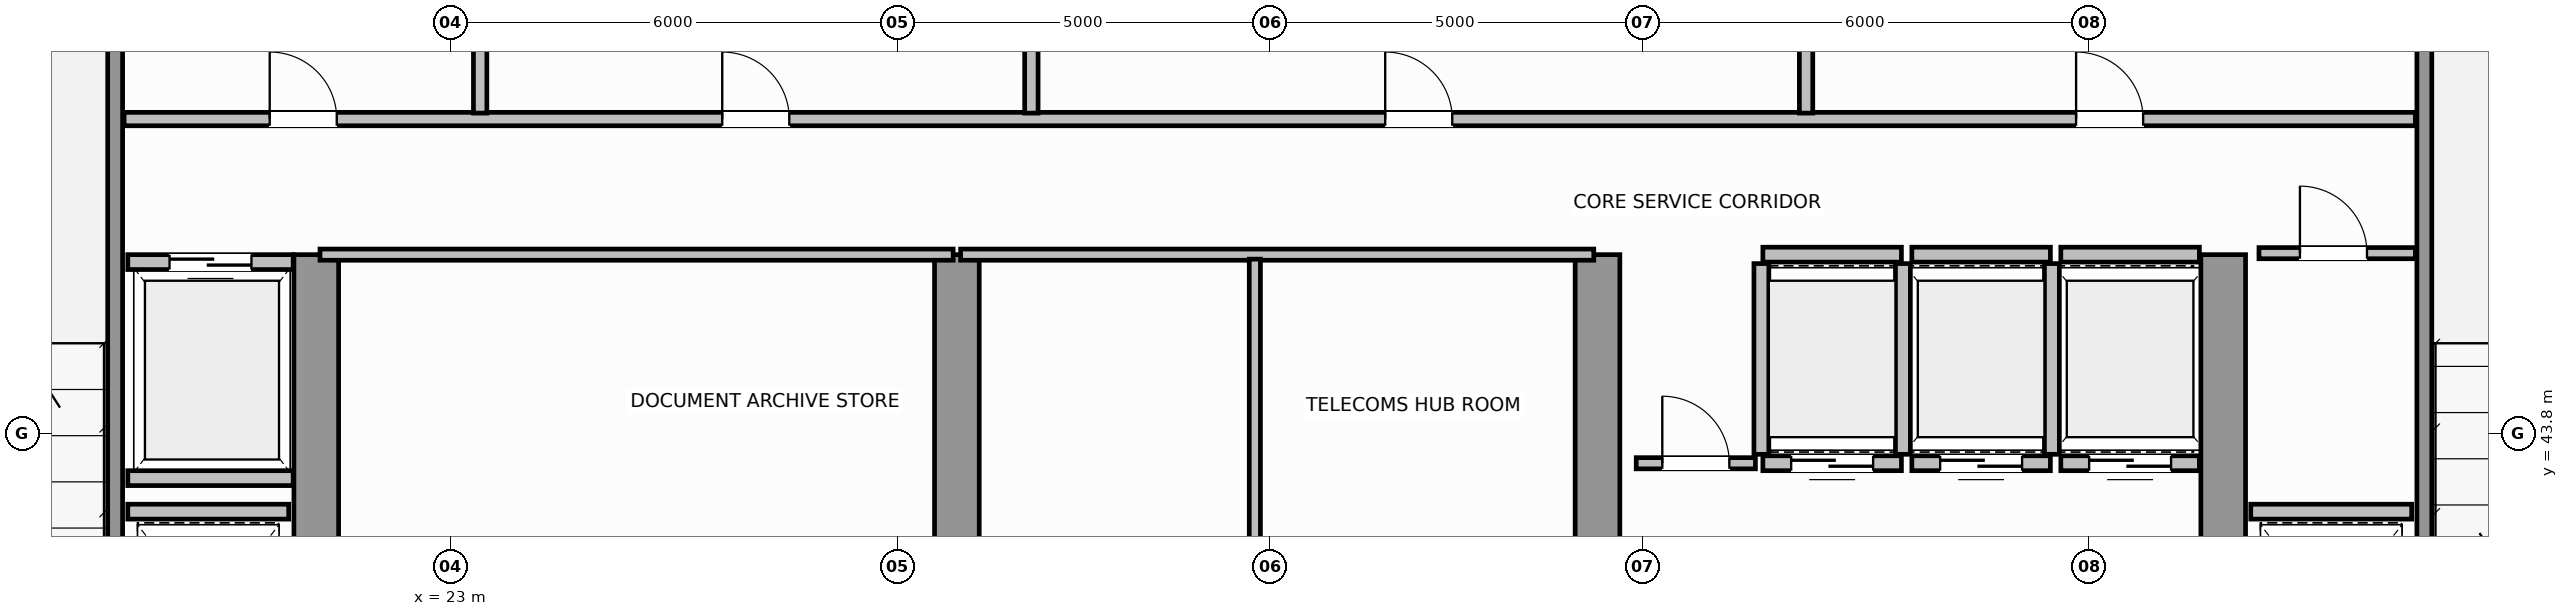
"""IFC4 building model, lengths in metres.
Left out: names, types, materials, properties, quantities, classifications, styles, units other than length and angle.
Written with IfcOpenShell. Run it as: python <this file> out.ifc"""

import sys

from ifc_helpers import new_model, si_unit, direction, frame, frame_2d, origin, place, context, subcontext, project, spatial, rectangle, extrude, source, transform, mapped, element, fill, save


model = new_model("IFC4")
c1 = context("Model", 3, precision=1e-05, world=origin(), true_north=direction((0.0, 1.0)))
c2 = subcontext(c1, "Body", "Model", "MODEL_VIEW")
j1 = project(units=[si_unit("LENGTHUNIT", "METRE"), si_unit("PLANEANGLEUNIT", "RADIAN")], contexts=[c1])
p1 = place(None, origin())
s1 = spatial("IfcSite", under=j1, at=p1, CompositionType="ELEMENT")
p2 = place(p1, origin())
s2 = spatial("IfcBuilding", under=s1, at=p2, CompositionType="ELEMENT")
p3 = place(p2, frame((0.0, 0.0, 223.2)))
s3 = spatial("IfcBuildingStorey", under=s2, at=p3, CompositionType="ELEMENT", Elevation=223.2)
for number, where, z_axis, x_axis in (
    (1, (21.2, 36.82, 0.0), (0.0, 0.0, 1.0), (0.0, 1.0, 0.0)),
    (2, (29.8, 36.82, 0.0), (0.0, 0.0, 1.0), (0.0, 1.0, 0.0)),
    (3, (38.4, 36.82, 0.0), (0.0, 0.0, 1.0), (0.0, 1.0, 0.0)),
    (4, (46.8, 36.82, 0.0), (0.0, 0.0, 1.0), (0.0, 1.0, 0.0)),
):
    element("IfcWall", number, at=place(p3, frame(where, z_axis=z_axis, x_axis=x_axis)), inside=s3, PredefinedType="SHEAR", context=c2, shape_type="SweptSolid", body=[
        extrude(rectangle(XDim=9.38, YDim=0.6, at=frame_2d((4.69, 0.0))), origin(), (0.0, 0.0, 1.0), 3.8),
    ])
for number, where, z_axis, x_axis in (
    (5, (18.5, 39.96, 0.0), (0.0, 0.0, 1.0), (0.0, 1.0, 0.0)),
    (6, (49.5, 39.96, 0.0), (0.0, 0.0, 1.0), (0.0, 1.0, 0.0)),
):
    element("IfcWall", number, at=place(p3, frame(where, z_axis=z_axis, x_axis=x_axis)), inside=s3, PredefinedType="SOLIDWALL", context=c2, shape_type="SweptSolid", body=[
        extrude(rectangle(XDim=9.93, YDim=0.2, at=frame_2d((4.965, 0.0))), origin(), (0.0, 0.0, 1.0), 3.8),
    ])
p4 = place(p3, frame((40.62, 43.4, 0.0), z_axis=(0.0, 0.0, 1.0), x_axis=(1.0, 0.0, 0.0)))
e7 = element("IfcWall", 7, at=p4, inside=s3, PredefinedType="SOLIDWALL", context=c2, shape_type="SweptSolid", body=[
    extrude(rectangle(XDim=1.86, YDim=0.2, at=frame_2d((0.93, 0.0))), origin(), (0.0, 0.0, 1.0), 3.58),
])
p5 = place(p4, frame((0.38, 0.0, 0.0)))
e8 = element("IfcOpeningElement", 8, at=p5, cuts=e7, PredefinedType="OPENING", context=c2, shape_type="SweptSolid", body=[
    extrude(rectangle(XDim=1.1, YDim=2.15, at=frame_2d((0.55, 1.075))), frame((0.0, 0.11, 0.0), z_axis=(0.0, -1.0, 0.0), x_axis=(1.0, 0.0, 0.0)), (0.0, 0.0, 1.0), 0.22),
])
p6 = place(p3, frame((40.62, 46.2, 0.0), z_axis=(0.0, 0.0, 1.0), x_axis=(1.0, 0.0, 0.0)))
e9 = element("IfcWall", 9, at=p6, inside=s3, PredefinedType="SOLIDWALL", context=c2, shape_type="SweptSolid", body=[
    extrude(rectangle(XDim=1.86, YDim=0.2, at=frame_2d((0.93, 0.0))), origin(), (0.0, 0.0, 1.0), 3.58),
])
for number, where, z_axis, x_axis in (
    (10, (40.6, 43.52, 0.0), (0.0, 0.0, 1.0), (0.0, 1.0, 0.0)),
    (11, (42.5, 43.52, 0.0), (0.0, 0.0, 1.0), (0.0, 1.0, 0.0)),
):
    element("IfcWall", number, at=place(p3, frame(where, z_axis=z_axis, x_axis=x_axis)), inside=s3, PredefinedType="SOLIDWALL", context=c2, shape_type="SweptSolid", body=[
        extrude(rectangle(XDim=2.56, YDim=0.2, at=frame_2d((1.28, 0.0))), origin(), (0.0, 0.0, 1.0), 3.58),
    ])
p7 = place(p3, frame((42.62, 43.4, 0.0), z_axis=(0.0, 0.0, 1.0), x_axis=(1.0, 0.0, 0.0)))
e12 = element("IfcWall", 12, at=p7, inside=s3, PredefinedType="SOLIDWALL", context=c2, shape_type="SweptSolid", body=[
    extrude(rectangle(XDim=1.86, YDim=0.2, at=frame_2d((0.93, 0.0))), origin(), (0.0, 0.0, 1.0), 3.58),
])
p8 = place(p7, frame((0.38, 0.0, 0.0)))
e13 = element("IfcOpeningElement", 13, at=p8, cuts=e12, PredefinedType="OPENING", context=c2, shape_type="SweptSolid", body=[
    extrude(rectangle(XDim=1.1, YDim=2.15, at=frame_2d((0.55, 1.075))), frame((0.0, 0.11, 0.0), z_axis=(0.0, -1.0, 0.0), x_axis=(1.0, 0.0, 0.0)), (0.0, 0.0, 1.0), 0.22),
])
p9 = place(p3, frame((42.62, 46.2, 0.0), z_axis=(0.0, 0.0, 1.0), x_axis=(1.0, 0.0, 0.0)))
e14 = element("IfcWall", 14, at=p9, inside=s3, PredefinedType="SOLIDWALL", context=c2, shape_type="SweptSolid", body=[
    extrude(rectangle(XDim=1.86, YDim=0.2, at=frame_2d((0.93, 0.0))), origin(), (0.0, 0.0, 1.0), 3.58),
])
p10 = place(p3, frame((44.5, 43.52, 0.0), z_axis=(0.0, 0.0, 1.0), x_axis=(0.0, 1.0, 0.0)))
e15 = element("IfcWall", 15, at=p10, inside=s3, PredefinedType="SOLIDWALL", context=c2, shape_type="SweptSolid", body=[
    extrude(rectangle(XDim=2.56, YDim=0.2, at=frame_2d((1.28, 0.0))), origin(), (0.0, 0.0, 1.0), 3.58),
])
p11 = place(p3, frame((44.62, 43.4, 0.0), z_axis=(0.0, 0.0, 1.0), x_axis=(1.0, 0.0, 0.0)))
e16 = element("IfcWall", 16, at=p11, inside=s3, PredefinedType="SOLIDWALL", context=c2, shape_type="SweptSolid", body=[
    extrude(rectangle(XDim=1.86, YDim=0.2, at=frame_2d((0.93, 0.0))), origin(), (0.0, 0.0, 1.0), 3.58),
])
p12 = place(p11, frame((0.38, 0.0, 0.0)))
e17 = element("IfcOpeningElement", 17, at=p12, cuts=e16, PredefinedType="OPENING", context=c2, shape_type="SweptSolid", body=[
    extrude(rectangle(XDim=1.1, YDim=2.15, at=frame_2d((0.55, 1.075))), frame((0.0, 0.11, 0.0), z_axis=(0.0, -1.0, 0.0), x_axis=(1.0, 0.0, 0.0)), (0.0, 0.0, 1.0), 0.22),
])
p13 = place(p3, frame((44.62, 46.2, 0.0), z_axis=(0.0, 0.0, 1.0), x_axis=(1.0, 0.0, 0.0)))
e18 = element("IfcWall", 18, at=p13, inside=s3, PredefinedType="SOLIDWALL", context=c2, shape_type="SweptSolid", body=[
    extrude(rectangle(XDim=1.86, YDim=0.2, at=frame_2d((0.93, 0.0))), origin(), (0.0, 0.0, 1.0), 3.58),
])
p14 = place(p3, frame((18.67, 46.1, 0.0), z_axis=(0.0, 0.0, 1.0), x_axis=(1.0, 0.0, 0.0)))
e19 = element("IfcWall", 19, at=p14, inside=s3, PredefinedType="SOLIDWALL", context=c2, shape_type="SweptSolid", body=[
    extrude(rectangle(XDim=2.22, YDim=0.2, at=frame_2d((1.11, 0.0))), origin(), (0.0, 0.0, 1.0), 3.58),
])
p15 = place(p14, frame((0.56, 0.0, 0.0)))
e20 = element("IfcOpeningElement", 20, at=p15, cuts=e19, PredefinedType="OPENING", context=c2, shape_type="SweptSolid", body=[
    extrude(rectangle(XDim=1.1, YDim=2.15, at=frame_2d((0.55, 1.075))), frame((0.0, 0.11, 0.0), z_axis=(0.0, -1.0, 0.0), x_axis=(1.0, 0.0, 0.0)), (0.0, 0.0, 1.0), 0.22),
])
p16 = place(p3, frame((18.67, 43.2, 0.0), z_axis=(0.0, 0.0, 1.0), x_axis=(1.0, 0.0, 0.0)))
e21 = element("IfcWall", 21, at=p16, inside=s3, PredefinedType="SOLIDWALL", context=c2, shape_type="SweptSolid", body=[
    extrude(rectangle(XDim=2.22, YDim=0.2, at=frame_2d((1.11, 0.0))), origin(), (0.0, 0.0, 1.0), 3.58),
])
for number, where, z_axis, x_axis in (
    (22, (18.67, 42.75, 0.0), (0.0, 0.0, 1.0), (1.0, 0.0, 0.0)),
    (23, (47.17, 42.75, 0.0), (0.0, 0.0, 1.0), (1.0, 0.0, 0.0)),
):
    element("IfcWall", number, at=place(p3, frame(where, z_axis=z_axis, x_axis=x_axis)), inside=s3, PredefinedType="SOLIDWALL", context=c2, shape_type="SweptSolid", body=[
        extrude(rectangle(XDim=2.16, YDim=0.2, at=frame_2d((1.08, 0.0))), origin(), (0.0, 0.0, 1.0), 3.58),
    ])
for number, where, z_axis, x_axis in (
    (24, (21.25, 46.2, 0.0), (0.0, 0.0, 1.0), (1.0, 0.0, 0.0)),
    (25, (29.85, 46.2, 0.0), (0.0, 0.0, 1.0), (1.0, 0.0, 0.0)),
):
    element("IfcWall", number, at=place(p3, frame(where, z_axis=z_axis, x_axis=x_axis)), inside=s3, PredefinedType="PARTITIONING", context=c2, shape_type="SweptSolid", body=[
        extrude(rectangle(XDim=8.5, YDim=0.15, at=frame_2d((4.25, 0.0))), origin(), (0.0, 0.0, 1.0), 3.58),
    ])
p17 = place(p3, frame((33.8, 36.56, 0.0), z_axis=(0.0, 0.0, 1.0), x_axis=(0.0, 1.0, 0.0)))
e26 = element("IfcWall", 26, at=p17, inside=s3, PredefinedType="PARTITIONING", context=c2, shape_type="SweptSolid", body=[
    extrude(rectangle(XDim=9.58, YDim=0.15, at=frame_2d((4.79, 0.0))), origin(), (0.0, 0.0, 1.0), 3.58),
])
p18 = place(p17, frame((4.2, 0.0, 0.0)))
e27 = element("IfcOpeningElement", 27, at=p18, cuts=e26, PredefinedType="OPENING", context=c2, shape_type="SweptSolid", body=[
    extrude(rectangle(XDim=0.9, YDim=2.1, at=frame_2d((0.45, 1.05))), frame((0.0, 0.085, 0.0), z_axis=(0.0, -1.0, 0.0), x_axis=(1.0, 0.0, 0.0)), (0.0, 0.0, 1.0), 0.17),
])
p19 = place(p3, frame((47.28, 46.22, 0.0), z_axis=(0.0, 0.0, 1.0), x_axis=(1.0, 0.0, 0.0)))
e28 = element("IfcWall", 28, at=p19, inside=s3, PredefinedType="PARTITIONING", context=c2, shape_type="SweptSolid", body=[
    extrude(rectangle(XDim=2.1, YDim=0.15, at=frame_2d((1.05, 0.0))), origin(), (0.0, 0.0, 1.0), 3.58),
])
p20 = place(p19, frame((0.55, 0.0, 0.0)))
e29 = element("IfcOpeningElement", 29, at=p20, cuts=e28, PredefinedType="OPENING", context=c2, shape_type="SweptSolid", body=[
    extrude(rectangle(XDim=0.9, YDim=2.1, at=frame_2d((0.45, 1.05))), frame((0.0, 0.085, 0.0), z_axis=(0.0, -1.0, 0.0), x_axis=(1.0, 0.0, 0.0)), (0.0, 0.0, 1.0), 0.17),
])
p21 = place(p3, frame((38.92, 43.4, 0.0), z_axis=(0.0, 0.0, 1.0), x_axis=(1.0, 0.0, 0.0)))
e30 = element("IfcWall", 30, at=p21, inside=s3, PredefinedType="PARTITIONING", context=c2, shape_type="SweptSolid", body=[
    extrude(rectangle(XDim=1.6, YDim=0.15, at=frame_2d((0.8, 0.0))), origin(), (0.0, 0.0, 1.0), 3.58),
])
p22 = place(p21, frame((0.35, 0.0, 0.0)))
e31 = element("IfcOpeningElement", 31, at=p22, cuts=e30, PredefinedType="OPENING", context=c2, shape_type="SweptSolid", body=[
    extrude(rectangle(XDim=0.9, YDim=2.1, at=frame_2d((0.45, 1.05))), frame((0.0, 0.085, 0.0), z_axis=(0.0, -1.0, 0.0), x_axis=(1.0, 0.0, 0.0)), (0.0, 0.0, 1.0), 0.17),
])
p23 = place(p3, frame((18.62, 48.02, 0.0), z_axis=(0.0, 0.0, 1.0), x_axis=(1.0, 0.0, 0.0)))
e32 = element("IfcWall", 32, at=p23, inside=s3, PredefinedType="PLUMBINGWALL", context=c2, shape_type="SweptSolid", body=[
    extrude(rectangle(XDim=30.76, YDim=0.18, at=frame_2d((15.38, 0.0))), origin(), (0.0, 0.0, 1.0), 3.58),
])
p24 = place(p23, frame((1.955, 0.0, 0.0)))
e33 = element("IfcOpeningElement", 33, at=p24, cuts=e32, PredefinedType="OPENING", context=c2, shape_type="SweptSolid", body=[
    extrude(rectangle(XDim=0.9, YDim=2.15, at=frame_2d((0.45, 1.075))), frame((0.0, 0.1, 0.0), z_axis=(0.0, -1.0, 0.0), x_axis=(1.0, 0.0, 0.0)), (0.0, 0.0, 1.0), 0.2),
])
p25 = place(p23, frame((8.03, 0.0, 0.0)))
e34 = element("IfcOpeningElement", 34, at=p25, cuts=e32, PredefinedType="OPENING", context=c2, shape_type="SweptSolid", body=[
    extrude(rectangle(XDim=0.9, YDim=2.15, at=frame_2d((0.45, 1.075))), frame((0.0, 0.1, 0.0), z_axis=(0.0, -1.0, 0.0), x_axis=(1.0, 0.0, 0.0)), (0.0, 0.0, 1.0), 0.2),
])
p26 = place(p23, frame((16.93, 0.0, 0.0)))
e35 = element("IfcOpeningElement", 35, at=p26, cuts=e32, PredefinedType="OPENING", context=c2, shape_type="SweptSolid", body=[
    extrude(rectangle(XDim=0.9, YDim=2.15, at=frame_2d((0.45, 1.075))), frame((0.0, 0.1, 0.0), z_axis=(0.0, -1.0, 0.0), x_axis=(1.0, 0.0, 0.0)), (0.0, 0.0, 1.0), 0.2),
])
p27 = place(p23, frame((26.205, 0.0, 0.0)))
e36 = element("IfcOpeningElement", 36, at=p27, cuts=e32, PredefinedType="OPENING", context=c2, shape_type="SweptSolid", body=[
    extrude(rectangle(XDim=0.9, YDim=2.15, at=frame_2d((0.45, 1.075))), frame((0.0, 0.1, 0.0), z_axis=(0.0, -1.0, 0.0), x_axis=(1.0, 0.0, 0.0)), (0.0, 0.0, 1.0), 0.2),
])
for number, where, z_axis, x_axis in (
    (37, (23.4, 48.1, 0.0), (0.0, 0.0, 1.0), (0.0, 1.0, 0.0)),
    (38, (30.8, 48.1, 0.0), (0.0, 0.0, 1.0), (0.0, 1.0, 0.0)),
    (39, (41.2, 48.1, 0.0), (0.0, 0.0, 1.0), (0.0, 1.0, 0.0)),
):
    element("IfcWall", number, at=place(p3, frame(where, z_axis=z_axis, x_axis=x_axis)), inside=s3, PredefinedType="PLUMBINGWALL", context=c2, shape_type="SweptSolid", body=[
        extrude(rectangle(XDim=2.28, YDim=0.18, at=frame_2d((1.14, 0.0))), origin(), (0.0, 0.0, 1.0), 3.58),
    ])
m1 = source(origin(), c2, "Body", "SweptSolid", [
    extrude(rectangle(XDim=1.1, YDim=2.15, at=frame_2d((0.55, 1.075))), frame((0.0, 0.025, 0.0), z_axis=(0.0, -1.0, 0.0), x_axis=(1.0, 0.0, 0.0)), (0.0, 0.0, 1.0), 0.05),
])
p28 = place(p5, origin())
e40 = element("IfcDoor", 40, at=p28, inside=s3, OperationType="DOUBLE_DOOR_SLIDING", PredefinedType="DOOR", context=c2, shape_type="MappedRepresentation", body=[
    mapped(m1, transform((0.0, 0.0, 0.0), scale=1.0)),
])
fill(e8, e40)
p29 = place(p8, origin())
e41 = element("IfcDoor", 41, at=p29, inside=s3, OperationType="DOUBLE_DOOR_SLIDING", PredefinedType="DOOR", context=c2, shape_type="MappedRepresentation", body=[
    mapped(m1, transform((0.0, 0.0, 0.0), scale=1.0)),
])
fill(e13, e41)
p30 = place(p12, origin())
e42 = element("IfcDoor", 42, at=p30, inside=s3, OperationType="DOUBLE_DOOR_SLIDING", PredefinedType="DOOR", context=c2, shape_type="MappedRepresentation", body=[
    mapped(m1, transform((0.0, 0.0, 0.0), scale=1.0)),
])
fill(e17, e42)
p31 = place(p15, origin())
e43 = element("IfcDoor", 43, at=p31, inside=s3, OperationType="DOUBLE_DOOR_SLIDING", PredefinedType="DOOR", context=c2, shape_type="MappedRepresentation", body=[
    mapped(m1, transform((0.0, 0.0, 0.0), scale=1.0)),
])
fill(e20, e43)
m2 = source(origin(), c2, "Body", "SweptSolid", [
    extrude(rectangle(XDim=0.9, YDim=2.1, at=frame_2d((0.45, 1.05))), frame((0.0, 0.025, 0.0), z_axis=(0.0, -1.0, 0.0), x_axis=(1.0, 0.0, 0.0)), (0.0, 0.0, 1.0), 0.05),
])
p32 = place(p20, origin())
e44 = element("IfcDoor", 44, at=p32, inside=s3, OperationType="SINGLE_SWING_RIGHT", PredefinedType="DOOR", context=c2, shape_type="MappedRepresentation", body=[
    mapped(m2, transform((0.0, 0.0, 0.0), scale=1.0)),
])
fill(e29, e44)
p33 = place(p22, origin())
e45 = element("IfcDoor", 45, at=p33, inside=s3, OperationType="SINGLE_SWING_LEFT", PredefinedType="DOOR", context=c2, shape_type="MappedRepresentation", body=[
    mapped(m2, transform((0.0, 0.0, 0.0), scale=1.0)),
])
fill(e31, e45)
m3 = source(origin(), c2, "Body", "SweptSolid", [
    extrude(rectangle(XDim=0.9, YDim=2.15, at=frame_2d((0.45, 1.075))), frame((0.0, 0.025, 0.0), z_axis=(0.0, -1.0, 0.0), x_axis=(1.0, 0.0, 0.0)), (0.0, 0.0, 1.0), 0.05),
])
p34 = place(p24, origin())
e46 = element("IfcDoor", 46, at=p34, inside=s3, OperationType="SINGLE_SWING_LEFT", PredefinedType="DOOR", context=c2, shape_type="MappedRepresentation", body=[
    mapped(m3, transform((0.0, 0.0, 0.0), scale=1.0)),
])
fill(e33, e46)
p35 = place(p25, origin())
e47 = element("IfcDoor", 47, at=p35, inside=s3, OperationType="SINGLE_SWING_RIGHT", PredefinedType="DOOR", context=c2, shape_type="MappedRepresentation", body=[
    mapped(m3, transform((0.0, 0.0, 0.0), scale=1.0)),
])
fill(e34, e47)
p36 = place(p26, origin())
e48 = element("IfcDoor", 48, at=p36, inside=s3, OperationType="SINGLE_SWING_LEFT", PredefinedType="DOOR", context=c2, shape_type="MappedRepresentation", body=[
    mapped(m3, transform((0.0, 0.0, 0.0), scale=1.0)),
])
fill(e35, e48)
p37 = place(p27, origin())
e49 = element("IfcDoor", 49, at=p37, inside=s3, OperationType="SINGLE_SWING_RIGHT", PredefinedType="DOOR", context=c2, shape_type="MappedRepresentation", body=[
    mapped(m3, transform((0.0, 0.0, 0.0), scale=1.0)),
])
fill(e36, e49)
save(model, sys.argv[1])
